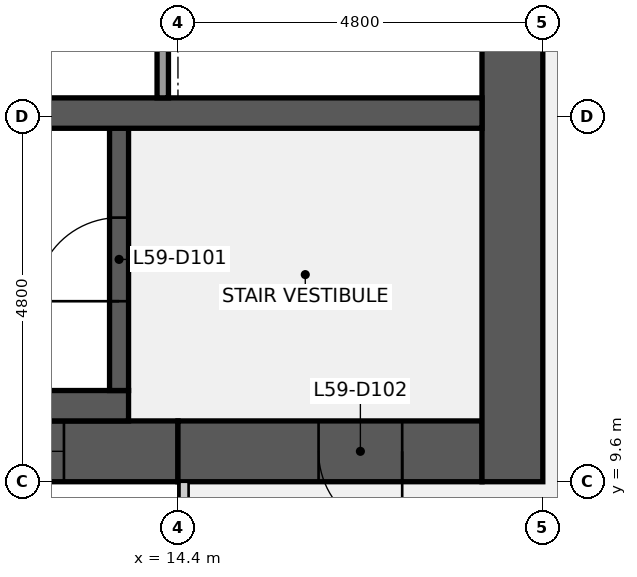
"""IFC4 building model, lengths in metres.
Left out: names, types, materials, properties, quantities, classifications, styles, units other than length and angle.
Written with IfcOpenShell. Run it as: python <this file> out.ifc"""

import sys

from ifc_helpers import new_model, si_unit, direction, frame, frame_2d, origin, place, context, subcontext, project, spatial, rectangle, extrude, element, fill, save


model = new_model("IFC4")
c1 = context("Model", 3, precision=1e-05, world=origin(), true_north=direction((0.0, 1.0)))
c2 = subcontext(c1, "Body", "Model", "MODEL_VIEW")
j1 = project(units=[si_unit("LENGTHUNIT", "METRE"), si_unit("PLANEANGLEUNIT", "RADIAN")], contexts=[c1])
p1 = place(None, origin())
s1 = spatial("IfcSite", under=j1, at=p1, CompositionType="ELEMENT")
p2 = place(p1, origin())
s2 = spatial("IfcBuilding", under=s1, at=p2, CompositionType="ELEMENT")
p3 = place(p2, frame((0.0, 0.0, 265.2)))
s3 = spatial("IfcBuildingStorey", under=s2, at=p3, CompositionType="ELEMENT", Elevation=265.2)
p4 = place(p3, frame((14.4, 10.0, 0.0), z_axis=(0.0, 0.0, 1.0), x_axis=(-1.0, 0.0, 0.0)))
e1 = element("IfcWall", 1, at=p4, inside=s3, PredefinedType="SHEAR", context=c2, shape_type="SweptSolid", body=[
    extrude(rectangle(XDim=13.6, YDim=0.8, at=frame_2d((6.8, 0.0))), origin(), (0.0, 0.0, 1.0), 4.1),
])
p5 = place(p4, frame((6.3, 0.0, 0.9)))
e2 = element("IfcOpeningElement", 2, at=p5, cuts=e1, PredefinedType="OPENING", context=c2, shape_type="SweptSolid", body=[
    extrude(rectangle(XDim=1.8, YDim=1.5, at=frame_2d((0.9, 0.75))), frame((0.0, 0.41, 0.0), z_axis=(0.0, -1.0, 0.0), x_axis=(1.0, 0.0, 0.0)), (0.0, 0.0, 1.0), 0.82),
])
p6 = place(p4, frame((1.5, 0.0, 0.9)))
e3 = element("IfcOpeningElement", 3, at=p6, cuts=e1, PredefinedType="OPENING", context=c2, shape_type="SweptSolid", body=[
    extrude(rectangle(XDim=1.8, YDim=1.5, at=frame_2d((0.9, 0.75))), frame((0.0, 0.41, 0.0), z_axis=(0.0, -1.0, 0.0), x_axis=(1.0, 0.0, 0.0)), (0.0, 0.0, 1.0), 0.82),
])
p7 = place(p3, frame((18.4, 10.0, 0.0), z_axis=(0.0, 0.0, 1.0), x_axis=(-1.0, 0.0, 0.0)))
e4 = element("IfcWall", 4, at=p7, inside=s3, PredefinedType="SHEAR", context=c2, shape_type="SweptSolid", body=[
    extrude(rectangle(XDim=4.0, YDim=0.8, at=frame_2d((2.0, 0.0))), origin(), (0.0, 0.0, 1.0), 4.1),
])
p8 = place(p7, frame((1.05, 0.0, 0.0)))
e5 = element("IfcOpeningElement", 5, at=p8, cuts=e4, PredefinedType="OPENING", context=c2, shape_type="SweptSolid", body=[
    extrude(rectangle(XDim=1.1, YDim=2.1, at=frame_2d((0.55, 1.05))), frame((0.0, 0.41, 0.0), z_axis=(0.0, -1.0, 0.0), x_axis=(1.0, 0.0, 0.0)), (0.0, 0.0, 1.0), 0.82),
])
p9 = place(p3, frame((18.8, 38.4, 0.0), z_axis=(0.0, 0.0, 1.0), x_axis=(0.0, -1.0, 0.0)))
e6 = element("IfcWall", 6, at=p9, inside=s3, PredefinedType="SHEAR", context=c2, shape_type="SweptSolid", body=[
    extrude(rectangle(XDim=28.8, YDim=0.8, at=frame_2d((14.4, 0.0))), origin(), (0.0, 0.0, 1.0), 4.1),
])
p10 = place(p9, frame((18.3, 0.0, 0.0)))
e7 = element("IfcOpeningElement", 7, at=p10, cuts=e6, PredefinedType="OPENING", context=c2, shape_type="SweptSolid", body=[
    extrude(rectangle(XDim=1.8, YDim=2.1, at=frame_2d((0.9, 1.05))), frame((0.0, 0.41, 0.0), z_axis=(0.0, -1.0, 0.0), x_axis=(1.0, 0.0, 0.0)), (0.0, 0.0, 1.0), 0.82),
])
p11 = place(p9, frame((8.7, 0.0, 0.0)))
e8 = element("IfcOpeningElement", 8, at=p11, cuts=e6, PredefinedType="OPENING", context=c2, shape_type="SweptSolid", body=[
    extrude(rectangle(XDim=1.8, YDim=2.1, at=frame_2d((0.9, 1.05))), frame((0.0, 0.41, 0.0), z_axis=(0.0, -1.0, 0.0), x_axis=(1.0, 0.0, 0.0)), (0.0, 0.0, 1.0), 0.82),
])
p12 = place(p3, frame((6.25, 10.6, 0.0), z_axis=(0.0, 0.0, 1.0), x_axis=(1.0, 0.0, 0.0)))
e9 = element("IfcWall", 9, at=p12, inside=s3, PredefinedType="SHEAR", context=c2, shape_type="SweptSolid", body=[
    extrude(rectangle(XDim=7.5, YDim=0.4, at=frame_2d((3.75, 0.0))), origin(), (0.0, 0.0, 1.0), 4.1),
])
p13 = place(p3, frame((13.625, 10.8, 0.0), z_axis=(0.0, 0.0, 1.0), x_axis=(0.0, 1.0, 0.0)))
e10 = element("IfcWall", 10, at=p13, inside=s3, PredefinedType="SHEAR", context=c2, shape_type="SweptSolid", body=[
    extrude(rectangle(XDim=3.45, YDim=0.25, at=frame_2d((1.725, 0.0))), origin(), (0.0, 0.0, 1.0), 4.1),
])
p14 = place(p13, frame((1.175, 0.0, 0.0)))
e11 = element("IfcOpeningElement", 11, at=p14, cuts=e10, PredefinedType="OPENING", context=c2, shape_type="SweptSolid", body=[
    extrude(rectangle(XDim=1.1, YDim=2.1, at=frame_2d((0.55, 1.05))), frame((0.0, 0.135, 0.0), z_axis=(0.0, -1.0, 0.0), x_axis=(1.0, 0.0, 0.0)), (0.0, 0.0, 1.0), 0.27),
])
p15 = place(p3, frame((0.8, 14.45, 0.0), z_axis=(0.0, 0.0, 1.0), x_axis=(1.0, 0.0, 0.0)))
e12 = element("IfcWall", 12, at=p15, inside=s3, PredefinedType="SHEAR", context=c2, shape_type="SweptSolid", body=[
    extrude(rectangle(XDim=17.6, YDim=0.4, at=frame_2d((8.8, 0.0))), origin(), (0.0, 0.0, 1.0), 4.1),
])
p16 = place(p3, frame((14.2, 14.65, 0.0), z_axis=(0.0, 0.0, 1.0), x_axis=(0.0, 1.0, 0.0)))
e13 = element("IfcWall", 13, at=p16, inside=s3, PredefinedType="PARTITIONING", context=c2, shape_type="SweptSolid", body=[
    extrude(rectangle(XDim=2.6, YDim=0.15, at=frame_2d((1.3, 0.0))), origin(), (0.0, 0.0, 1.0), 4.1),
])
p17 = place(p14, origin())
e14 = element("IfcDoor", 14, at=p17, inside=s3, OperationType="SINGLE_SWING_LEFT", PredefinedType="DOOR", context=c2, shape_type="SweptSolid", body=[
    extrude(rectangle(XDim=1.1, YDim=2.1, at=frame_2d((0.55, 1.05))), frame((0.0, 0.025, 0.0), z_axis=(0.0, -1.0, 0.0), x_axis=(1.0, 0.0, 0.0)), (0.0, 0.0, 1.0), 0.05),
])
fill(e11, e14)
p18 = place(p8, origin())
e15 = element("IfcDoor", 15, at=p18, inside=s3, OperationType="SINGLE_SWING_LEFT", PredefinedType="DOOR", context=c2, shape_type="SweptSolid", body=[
    extrude(rectangle(XDim=1.1, YDim=2.1, at=frame_2d((0.55, 1.05))), frame((0.0, 0.025, 0.0), z_axis=(0.0, -1.0, 0.0), x_axis=(1.0, 0.0, 0.0)), (0.0, 0.0, 1.0), 0.05),
])
fill(e5, e15)
p19 = place(p6, origin())
e16 = element("IfcWindow", 16, at=p19, inside=s3, PartitioningType="SINGLE_PANEL", PredefinedType="WINDOW", context=c2, shape_type="SweptSolid", body=[
    extrude(rectangle(XDim=1.8, YDim=1.5, at=frame_2d((0.9, 0.75))), frame((0.0, 0.03, 0.0), z_axis=(0.0, -1.0, 0.0), x_axis=(1.0, 0.0, 0.0)), (0.0, 0.0, 1.0), 0.06),
])
fill(e3, e16)
save(model, sys.argv[1])
